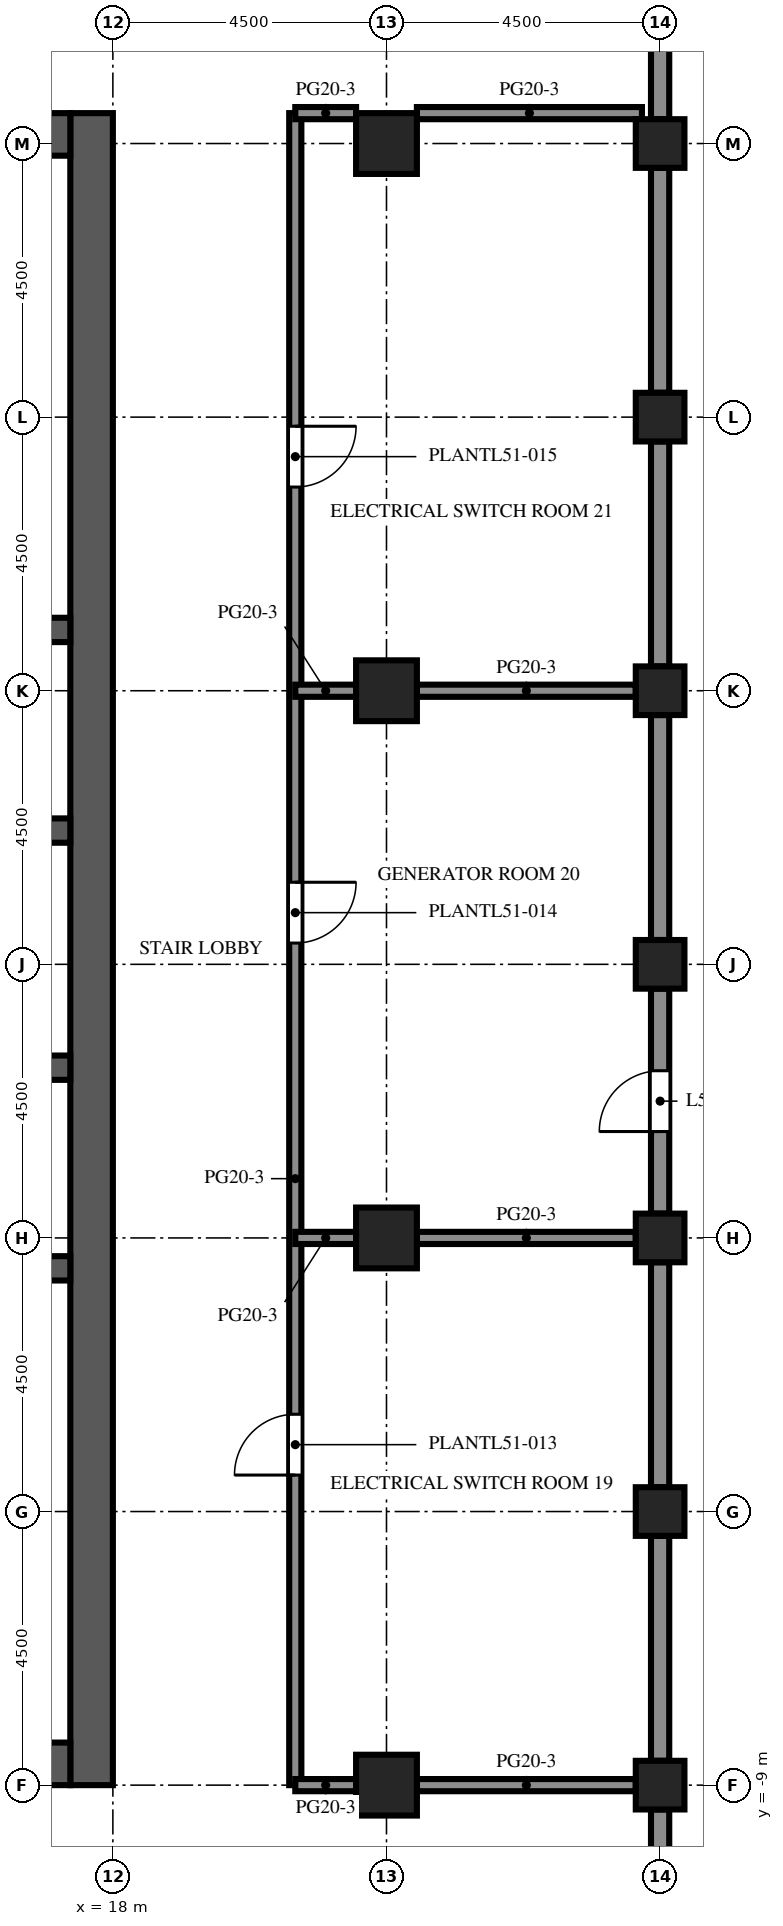
"""IFC4 building model, lengths in metres.
Left out: names, types, materials, properties, quantities, classifications, styles, units other than length and angle.
Written with IfcOpenShell. Run it as: python <this file> out.ifc"""

import sys

from ifc_helpers import new_model, si_unit, direction, frame, frame_2d, origin, origin_2d, place, context, subcontext, project, spatial, rectangle, extrude, element, fill, save


model = new_model("IFC4")
c1 = context("Model", 3, precision=1e-05, world=origin(), true_north=direction((0.0, 1.0)))
c2 = subcontext(c1, "Body", "Model", "MODEL_VIEW")
j1 = project(units=[si_unit("LENGTHUNIT", "METRE"), si_unit("PLANEANGLEUNIT", "RADIAN")], contexts=[c1])
p1 = place(None, origin())
s1 = spatial("IfcSite", under=j1, at=p1, CompositionType="ELEMENT")
p2 = place(p1, origin())
s2 = spatial("IfcBuilding", under=s1, at=p2, CompositionType="ELEMENT")
p3 = place(p2, frame((0.0, 0.0, 226.2)))
s3 = spatial("IfcBuildingStorey", under=s2, at=p3, CompositionType="ELEMENT", Elevation=226.2)
for number, where, z_axis, x_axis in (
    (1, (27.0, -9.0, -0.6), (0.0, 0.0, 1.0), (1.0, 0.0, 0.0)),
    (2, (27.0, -4.5, -0.6), (0.0, 0.0, 1.0), (1.0, 0.0, 0.0)),
    (3, (27.0, 0.0, -0.6), (0.0, 0.0, 1.0), (1.0, 0.0, 0.0)),
    (4, (27.0, 4.5, -0.6), (0.0, 0.0, 1.0), (1.0, 0.0, 0.0)),
    (5, (27.0, 9.0, -0.6), (0.0, 0.0, 1.0), (1.0, 0.0, 0.0)),
    (6, (27.0, 13.5, -0.6), (0.0, 0.0, 1.0), (1.0, 0.0, 0.0)),
    (7, (27.0, 18.0, -0.6), (0.0, 0.0, 1.0), (1.0, 0.0, 0.0)),
):
    element("IfcColumn", number, at=place(p3, frame(where, z_axis=z_axis, x_axis=x_axis)), inside=s3, PredefinedType="COLUMN", context=c2, shape_type="SweptSolid", body=[
        extrude(rectangle(XDim=0.8, YDim=0.8, at=origin_2d()), origin(), (0.0, 0.0, 1.0), 6.0),
    ])
for number, where, z_axis, x_axis in (
    (8, (22.5, -9.0, 0.0), (0.0, 0.0, 1.0), (1.0, 0.0, 0.0)),
    (9, (22.5, 0.0, 0.0), (0.0, 0.0, 1.0), (1.0, 0.0, 0.0)),
    (10, (22.5, 9.0, 0.0), (0.0, 0.0, 1.0), (1.0, 0.0, 0.0)),
    (11, (22.5, 18.0, 0.0), (0.0, 0.0, 1.0), (1.0, 0.0, 0.0)),
):
    element("IfcColumn", number, at=place(p3, frame(where, z_axis=z_axis, x_axis=x_axis)), inside=s3, PredefinedType="COLUMN", context=c2, shape_type="SweptSolid", body=[
        extrude(rectangle(XDim=1.0, YDim=1.0, at=origin_2d()), origin(), (0.0, 0.0, 1.0), 5.4),
    ])
p4 = place(p3, frame((17.65, -9.0, 0.0), z_axis=(0.0, 0.0, 1.0), x_axis=(0.0, 1.0, 0.0)))
e12 = element("IfcWall", 12, at=p4, inside=s3, PredefinedType="SHEAR", context=c2, shape_type="SweptSolid", body=[
    extrude(rectangle(XDim=27.5, YDim=0.7, at=frame_2d((13.75, 0.0))), origin(), (0.0, 0.0, 1.0), 5.4),
])
p5 = place(p4, frame((12.55, 0.0, 0.0)))
e13 = element("IfcOpeningElement", 13, at=p5, cuts=e12, PredefinedType="OPENING", context=c2, shape_type="SweptSolid", body=[
    extrude(rectangle(XDim=2.4, YDim=2.4, at=frame_2d((1.2, 1.2))), frame((0.0, 0.36, 0.0), z_axis=(0.0, -1.0, 0.0), x_axis=(1.0, 0.0, 0.0)), (0.0, 0.0, 1.0), 0.72),
])
p6 = place(p4, frame((6.825, 0.0, 0.0)))
e14 = element("IfcOpeningElement", 14, at=p6, cuts=e12, PredefinedType="OPENING", context=c2, shape_type="SweptSolid", body=[
    extrude(rectangle(XDim=1.2, YDim=2.1, at=frame_2d((0.6, 1.05))), frame((0.0, 0.36, 0.0), z_axis=(0.0, -1.0, 0.0), x_axis=(1.0, 0.0, 0.0)), (0.0, 0.0, 1.0), 0.72),
])
p7 = place(p4, frame((19.475, 0.0, 0.0)))
e15 = element("IfcOpeningElement", 15, at=p7, cuts=e12, PredefinedType="OPENING", context=c2, shape_type="SweptSolid", body=[
    extrude(rectangle(XDim=1.2, YDim=2.1, at=frame_2d((0.6, 1.05))), frame((0.0, 0.36, 0.0), z_axis=(0.0, -1.0, 0.0), x_axis=(1.0, 0.0, 0.0)), (0.0, 0.0, 1.0), 0.72),
])
for number, where, z_axis, x_axis in (
    (16, (6.7, -8.65, 0.0), (0.0, 0.0, 1.0), (1.0, 0.0, 0.0)),
    (17, (6.7, 18.15, 0.0), (0.0, 0.0, 1.0), (1.0, 0.0, 0.0)),
):
    element("IfcWall", number, at=place(p3, frame(where, z_axis=z_axis, x_axis=x_axis)), inside=s3, PredefinedType="SHEAR", context=c2, shape_type="SweptSolid", body=[
        extrude(rectangle(XDim=10.6, YDim=0.7, at=frame_2d((5.3, 0.0))), origin(), (0.0, 0.0, 1.0), 5.4),
    ])
p8 = place(p3, frame((6.7, -0.5, 0.0), z_axis=(0.0, 0.0, 1.0), x_axis=(1.0, 0.0, 0.0)))
e18 = element("IfcWall", 18, at=p8, inside=s3, PredefinedType="SHEAR", context=c2, shape_type="SweptSolid", body=[
    extrude(rectangle(XDim=10.6, YDim=0.4, at=frame_2d((5.3, 0.0))), origin(), (0.0, 0.0, 1.0), 5.4),
])
p9 = place(p3, frame((6.7, 2.8, 0.0), z_axis=(0.0, 0.0, 1.0), x_axis=(1.0, 0.0, 0.0)))
e19 = element("IfcWall", 19, at=p9, inside=s3, PredefinedType="SHEAR", context=c2, shape_type="SweptSolid", body=[
    extrude(rectangle(XDim=10.6, YDim=0.4, at=frame_2d((5.3, 0.0))), origin(), (0.0, 0.0, 1.0), 5.4),
])
p10 = place(p9, frame((0.688, 0.0, 0.0)))
e20 = element("IfcOpeningElement", 20, at=p10, cuts=e19, PredefinedType="OPENING", context=c2, shape_type="SweptSolid", body=[
    extrude(rectangle(XDim=1.1, YDim=2.1, at=frame_2d((0.55, 1.05))), frame((0.0, 0.21, 0.0), z_axis=(0.0, -1.0, 0.0), x_axis=(1.0, 0.0, 0.0)), (0.0, 0.0, 1.0), 0.42),
])
p11 = place(p9, frame((3.438, 0.0, 0.0)))
e21 = element("IfcOpeningElement", 21, at=p11, cuts=e19, PredefinedType="OPENING", context=c2, shape_type="SweptSolid", body=[
    extrude(rectangle(XDim=1.1, YDim=2.1, at=frame_2d((0.55, 1.05))), frame((0.0, 0.21, 0.0), z_axis=(0.0, -1.0, 0.0), x_axis=(1.0, 0.0, 0.0)), (0.0, 0.0, 1.0), 0.42),
])
p12 = place(p9, frame((6.113, 0.0, 0.0)))
e22 = element("IfcOpeningElement", 22, at=p12, cuts=e19, PredefinedType="OPENING", context=c2, shape_type="SweptSolid", body=[
    extrude(rectangle(XDim=1.0, YDim=2.1, at=frame_2d((0.5, 1.05))), frame((0.0, 0.21, 0.0), z_axis=(0.0, -1.0, 0.0), x_axis=(1.0, 0.0, 0.0)), (0.0, 0.0, 1.0), 0.42),
])
p13 = place(p9, frame((8.863, 0.0, 0.0)))
e23 = element("IfcOpeningElement", 23, at=p13, cuts=e19, PredefinedType="OPENING", context=c2, shape_type="SweptSolid", body=[
    extrude(rectangle(XDim=1.0, YDim=2.1, at=frame_2d((0.5, 1.05))), frame((0.0, 0.21, 0.0), z_axis=(0.0, -1.0, 0.0), x_axis=(1.0, 0.0, 0.0)), (0.0, 0.0, 1.0), 0.42),
])
p14 = place(p3, frame((6.7, 6.7, 0.0), z_axis=(0.0, 0.0, 1.0), x_axis=(1.0, 0.0, 0.0)))
e24 = element("IfcWall", 24, at=p14, inside=s3, PredefinedType="SHEAR", context=c2, shape_type="SweptSolid", body=[
    extrude(rectangle(XDim=10.6, YDim=0.4, at=frame_2d((5.3, 0.0))), origin(), (0.0, 0.0, 1.0), 5.4),
])
p15 = place(p14, frame((3.438, 0.0, 0.0)))
e25 = element("IfcOpeningElement", 25, at=p15, cuts=e24, PredefinedType="OPENING", context=c2, shape_type="SweptSolid", body=[
    extrude(rectangle(XDim=1.1, YDim=2.1, at=frame_2d((0.55, 1.05))), frame((0.0, 0.21, 0.0), z_axis=(0.0, -1.0, 0.0), x_axis=(1.0, 0.0, 0.0)), (0.0, 0.0, 1.0), 0.42),
])
p16 = place(p14, frame((6.062, 0.0, 0.0)))
e26 = element("IfcOpeningElement", 26, at=p16, cuts=e24, PredefinedType="OPENING", context=c2, shape_type="SweptSolid", body=[
    extrude(rectangle(XDim=1.1, YDim=2.1, at=frame_2d((0.55, 1.05))), frame((0.0, 0.21, 0.0), z_axis=(0.0, -1.0, 0.0), x_axis=(1.0, 0.0, 0.0)), (0.0, 0.0, 1.0), 0.42),
])
p17 = place(p14, frame((8.812, 0.0, 0.0)))
e27 = element("IfcOpeningElement", 27, at=p17, cuts=e24, PredefinedType="OPENING", context=c2, shape_type="SweptSolid", body=[
    extrude(rectangle(XDim=1.1, YDim=2.1, at=frame_2d((0.55, 1.05))), frame((0.0, 0.21, 0.0), z_axis=(0.0, -1.0, 0.0), x_axis=(1.0, 0.0, 0.0)), (0.0, 0.0, 1.0), 0.42),
])
p18 = place(p14, frame((0.738, 0.0, 0.0)))
e28 = element("IfcOpeningElement", 28, at=p18, cuts=e24, PredefinedType="OPENING", context=c2, shape_type="SweptSolid", body=[
    extrude(rectangle(XDim=1.0, YDim=2.1, at=frame_2d((0.5, 1.05))), frame((0.0, 0.21, 0.0), z_axis=(0.0, -1.0, 0.0), x_axis=(1.0, 0.0, 0.0)), (0.0, 0.0, 1.0), 0.42),
])
p19 = place(p3, frame((6.7, 10.0, 0.0), z_axis=(0.0, 0.0, 1.0), x_axis=(1.0, 0.0, 0.0)))
e29 = element("IfcWall", 29, at=p19, inside=s3, PredefinedType="SHEAR", context=c2, shape_type="SweptSolid", body=[
    extrude(rectangle(XDim=10.6, YDim=0.4, at=frame_2d((5.3, 0.0))), origin(), (0.0, 0.0, 1.0), 5.4),
])
for number, where, z_axis, x_axis in (
    (30, (27.0, -9.4, 0.0), (0.0, 0.0, 1.0), (0.0, -1.0, 0.0)),
    (31, (27.0, -4.9, 0.0), (0.0, 0.0, 1.0), (0.0, -1.0, 0.0)),
    (32, (27.0, -0.4, 0.0), (0.0, 0.0, 1.0), (0.0, -1.0, 0.0)),
):
    element("IfcWall", number, at=place(p3, frame(where, z_axis=z_axis, x_axis=x_axis)), inside=s3, PredefinedType="SOLIDWALL", context=c2, shape_type="SweptSolid", body=[
        extrude(rectangle(XDim=3.7, YDim=0.3, at=frame_2d((1.85, 0.0))), origin(), (0.0, 0.0, 1.0), 3.75),
    ])
p20 = place(p3, frame((27.0, 4.1, 0.0), z_axis=(0.0, 0.0, 1.0), x_axis=(0.0, -1.0, 0.0)))
e33 = element("IfcWall", 33, at=p20, inside=s3, PredefinedType="SOLIDWALL", context=c2, shape_type="SweptSolid", body=[
    extrude(rectangle(XDim=3.7, YDim=0.3, at=frame_2d((1.85, 0.0))), origin(), (0.0, 0.0, 1.0), 3.75),
])
p21 = place(p20, frame((1.35, 0.0, 0.0)))
e34 = element("IfcOpeningElement", 34, at=p21, cuts=e33, PredefinedType="OPENING", context=c2, shape_type="SweptSolid", body=[
    extrude(rectangle(XDim=1.0, YDim=2.2, at=frame_2d((0.5, 1.1))), frame((0.0, 0.16, 0.0), z_axis=(0.0, -1.0, 0.0), x_axis=(1.0, 0.0, 0.0)), (0.0, 0.0, 1.0), 0.32),
])
for number, where, z_axis, x_axis in (
    (35, (27.0, 8.6, 0.0), (0.0, 0.0, 1.0), (0.0, -1.0, 0.0)),
    (36, (27.0, 13.1, 0.0), (0.0, 0.0, 1.0), (0.0, -1.0, 0.0)),
    (37, (27.0, 17.6, 0.0), (0.0, 0.0, 1.0), (0.0, -1.0, 0.0)),
    (38, (27.0, 22.1, 0.0), (0.0, 0.0, 1.0), (0.0, -1.0, 0.0)),
):
    element("IfcWall", number, at=place(p3, frame(where, z_axis=z_axis, x_axis=x_axis)), inside=s3, PredefinedType="SOLIDWALL", context=c2, shape_type="SweptSolid", body=[
        extrude(rectangle(XDim=3.7, YDim=0.3, at=frame_2d((1.85, 0.0))), origin(), (0.0, 0.0, 1.0), 3.75),
    ])
p22 = place(p3, frame((21.0, 18.5, 0.0), z_axis=(0.0, 0.0, 1.0), x_axis=(0.0, -1.0, 0.0)))
e39 = element("IfcWall", 39, at=p22, inside=s3, PredefinedType="PARTITIONING", context=c2, shape_type="SweptSolid", body=[
    extrude(rectangle(XDim=27.5, YDim=0.2, at=frame_2d((13.75, 0.0))), origin(), (0.0, 0.0, 1.0), 4.95),
])
p23 = place(p22, frame((21.4, 0.0, 0.0)))
e40 = element("IfcOpeningElement", 40, at=p23, cuts=e39, PredefinedType="OPENING", context=c2, shape_type="SweptSolid", body=[
    extrude(rectangle(XDim=1.0, YDim=2.1, at=frame_2d((0.5, 1.05))), frame((0.0, 0.11, 0.0), z_axis=(0.0, -1.0, 0.0), x_axis=(1.0, 0.0, 0.0)), (0.0, 0.0, 1.0), 0.22),
])
p24 = place(p22, frame((12.65, 0.0, 0.0)))
e41 = element("IfcOpeningElement", 41, at=p24, cuts=e39, PredefinedType="OPENING", context=c2, shape_type="SweptSolid", body=[
    extrude(rectangle(XDim=1.0, YDim=2.1, at=frame_2d((0.5, 1.05))), frame((0.0, 0.11, 0.0), z_axis=(0.0, -1.0, 0.0), x_axis=(1.0, 0.0, 0.0)), (0.0, 0.0, 1.0), 0.22),
])
p25 = place(p22, frame((5.15, 0.0, 0.0)))
e42 = element("IfcOpeningElement", 42, at=p25, cuts=e39, PredefinedType="OPENING", context=c2, shape_type="SweptSolid", body=[
    extrude(rectangle(XDim=1.0, YDim=2.1, at=frame_2d((0.5, 1.05))), frame((0.0, 0.11, 0.0), z_axis=(0.0, -1.0, 0.0), x_axis=(1.0, 0.0, 0.0)), (0.0, 0.0, 1.0), 0.22),
])
p26 = place(p3, frame((21.0, -9.0, 0.0), z_axis=(0.0, 0.0, 1.0), x_axis=(1.0, 0.0, 0.0)))
e43 = element("IfcWall", 43, at=p26, inside=s3, PredefinedType="PARTITIONING", context=c2, shape_type="SweptSolid", body=[
    extrude(rectangle(XDim=1.0, YDim=0.2, at=frame_2d((0.5, 0.0))), origin(), (0.0, 0.0, 1.0), 4.95),
])
p27 = place(p3, frame((23.0, -9.0, 0.0), z_axis=(0.0, 0.0, 1.0), x_axis=(1.0, 0.0, 0.0)))
e44 = element("IfcWall", 44, at=p27, inside=s3, PredefinedType="PARTITIONING", context=c2, shape_type="SweptSolid", body=[
    extrude(rectangle(XDim=3.6, YDim=0.2, at=frame_2d((1.8, 0.0))), origin(), (0.0, 0.0, 1.0), 4.95),
])
p28 = place(p3, frame((21.0, 0.0, 0.0), z_axis=(0.0, 0.0, 1.0), x_axis=(1.0, 0.0, 0.0)))
e45 = element("IfcWall", 45, at=p28, inside=s3, PredefinedType="PARTITIONING", context=c2, shape_type="SweptSolid", body=[
    extrude(rectangle(XDim=1.0, YDim=0.2, at=frame_2d((0.5, 0.0))), origin(), (0.0, 0.0, 1.0), 4.95),
])
p29 = place(p3, frame((23.0, 0.0, 0.0), z_axis=(0.0, 0.0, 1.0), x_axis=(1.0, 0.0, 0.0)))
e46 = element("IfcWall", 46, at=p29, inside=s3, PredefinedType="PARTITIONING", context=c2, shape_type="SweptSolid", body=[
    extrude(rectangle(XDim=3.6, YDim=0.2, at=frame_2d((1.8, 0.0))), origin(), (0.0, 0.0, 1.0), 4.95),
])
p30 = place(p3, frame((21.0, 9.0, 0.0), z_axis=(0.0, 0.0, 1.0), x_axis=(1.0, 0.0, 0.0)))
e47 = element("IfcWall", 47, at=p30, inside=s3, PredefinedType="PARTITIONING", context=c2, shape_type="SweptSolid", body=[
    extrude(rectangle(XDim=1.0, YDim=0.2, at=frame_2d((0.5, 0.0))), origin(), (0.0, 0.0, 1.0), 4.95),
])
p31 = place(p3, frame((23.0, 9.0, 0.0), z_axis=(0.0, 0.0, 1.0), x_axis=(1.0, 0.0, 0.0)))
e48 = element("IfcWall", 48, at=p31, inside=s3, PredefinedType="PARTITIONING", context=c2, shape_type="SweptSolid", body=[
    extrude(rectangle(XDim=3.6, YDim=0.2, at=frame_2d((1.8, 0.0))), origin(), (0.0, 0.0, 1.0), 4.95),
])
p32 = place(p3, frame((21.0, 18.5, 0.0), z_axis=(0.0, 0.0, 1.0), x_axis=(1.0, 0.0, 0.0)))
e49 = element("IfcWall", 49, at=p32, inside=s3, PredefinedType="PARTITIONING", context=c2, shape_type="SweptSolid", body=[
    extrude(rectangle(XDim=1.0, YDim=0.2, at=frame_2d((0.5, 0.0))), origin(), (0.0, 0.0, 1.0), 4.95),
])
p33 = place(p3, frame((23.0, 18.5, 0.0), z_axis=(0.0, 0.0, 1.0), x_axis=(1.0, 0.0, 0.0)))
e50 = element("IfcWall", 50, at=p33, inside=s3, PredefinedType="PARTITIONING", context=c2, shape_type="SweptSolid", body=[
    extrude(rectangle(XDim=3.701, YDim=0.2, at=frame_2d((1.851, 0.0))), origin(), (0.0, 0.0, 1.0), 4.95),
])
p34 = place(p21, origin())
e51 = element("IfcDoor", 51, at=p34, inside=s3, OperationType="SINGLE_SWING_RIGHT", PredefinedType="DOOR", context=c2, shape_type="SweptSolid", body=[
    extrude(rectangle(XDim=1.0, YDim=2.2, at=frame_2d((0.5, 1.1))), frame((0.0, 0.025, 0.0), z_axis=(0.0, -1.0, 0.0), x_axis=(1.0, 0.0, 0.0)), (0.0, 0.0, 1.0), 0.05),
])
fill(e34, e51)
p35 = place(p5, origin())
e52 = element("IfcDoor", 52, at=p35, inside=s3, OperationType="DOUBLE_DOOR_DOUBLE_SWING", PredefinedType="DOOR", context=c2, shape_type="SweptSolid", body=[
    extrude(rectangle(XDim=2.4, YDim=2.4, at=frame_2d((1.2, 1.2))), frame((0.0, 0.025, 0.0), z_axis=(0.0, -1.0, 0.0), x_axis=(1.0, 0.0, 0.0)), (0.0, 0.0, 1.0), 0.05),
])
fill(e13, e52)
p36 = place(p6, frame((1.2, 0.0, 0.0), z_axis=(0.0, 0.0, 1.0), x_axis=(-1.0, 0.0, 0.0)))
e53 = element("IfcDoor", 53, at=p36, inside=s3, OperationType="SINGLE_SWING_LEFT", PredefinedType="DOOR", context=c2, shape_type="SweptSolid", body=[
    extrude(rectangle(XDim=1.2, YDim=2.1, at=frame_2d((0.6, 1.05))), frame((0.0, 0.025, 0.0), z_axis=(0.0, -1.0, 0.0), x_axis=(1.0, 0.0, 0.0)), (0.0, 0.0, 1.0), 0.05),
])
fill(e14, e53)
p37 = place(p7, frame((1.2, 0.0, 0.0), z_axis=(0.0, 0.0, 1.0), x_axis=(-1.0, 0.0, 0.0)))
e54 = element("IfcDoor", 54, at=p37, inside=s3, OperationType="SINGLE_SWING_LEFT", PredefinedType="DOOR", context=c2, shape_type="SweptSolid", body=[
    extrude(rectangle(XDim=1.2, YDim=2.1, at=frame_2d((0.6, 1.05))), frame((0.0, 0.025, 0.0), z_axis=(0.0, -1.0, 0.0), x_axis=(1.0, 0.0, 0.0)), (0.0, 0.0, 1.0), 0.05),
])
fill(e15, e54)
p38 = place(p23, origin())
e55 = element("IfcDoor", 55, at=p38, inside=s3, OperationType="SINGLE_SWING_RIGHT", PredefinedType="DOOR", context=c2, shape_type="SweptSolid", body=[
    extrude(rectangle(XDim=1.0, YDim=2.1, at=frame_2d((0.5, 1.05))), frame((0.0, 0.025, 0.0), z_axis=(0.0, -1.0, 0.0), x_axis=(1.0, 0.0, 0.0)), (0.0, 0.0, 1.0), 0.05),
])
fill(e40, e55)
p39 = place(p24, origin())
e56 = element("IfcDoor", 56, at=p39, inside=s3, OperationType="SINGLE_SWING_LEFT", PredefinedType="DOOR", context=c2, shape_type="SweptSolid", body=[
    extrude(rectangle(XDim=1.0, YDim=2.1, at=frame_2d((0.5, 1.05))), frame((0.0, 0.025, 0.0), z_axis=(0.0, -1.0, 0.0), x_axis=(1.0, 0.0, 0.0)), (0.0, 0.0, 1.0), 0.05),
])
fill(e41, e56)
p40 = place(p25, origin())
e57 = element("IfcDoor", 57, at=p40, inside=s3, OperationType="SINGLE_SWING_LEFT", PredefinedType="DOOR", context=c2, shape_type="SweptSolid", body=[
    extrude(rectangle(XDim=1.0, YDim=2.1, at=frame_2d((0.5, 1.05))), frame((0.0, 0.025, 0.0), z_axis=(0.0, -1.0, 0.0), x_axis=(1.0, 0.0, 0.0)), (0.0, 0.0, 1.0), 0.05),
])
fill(e42, e57)
save(model, sys.argv[1])
